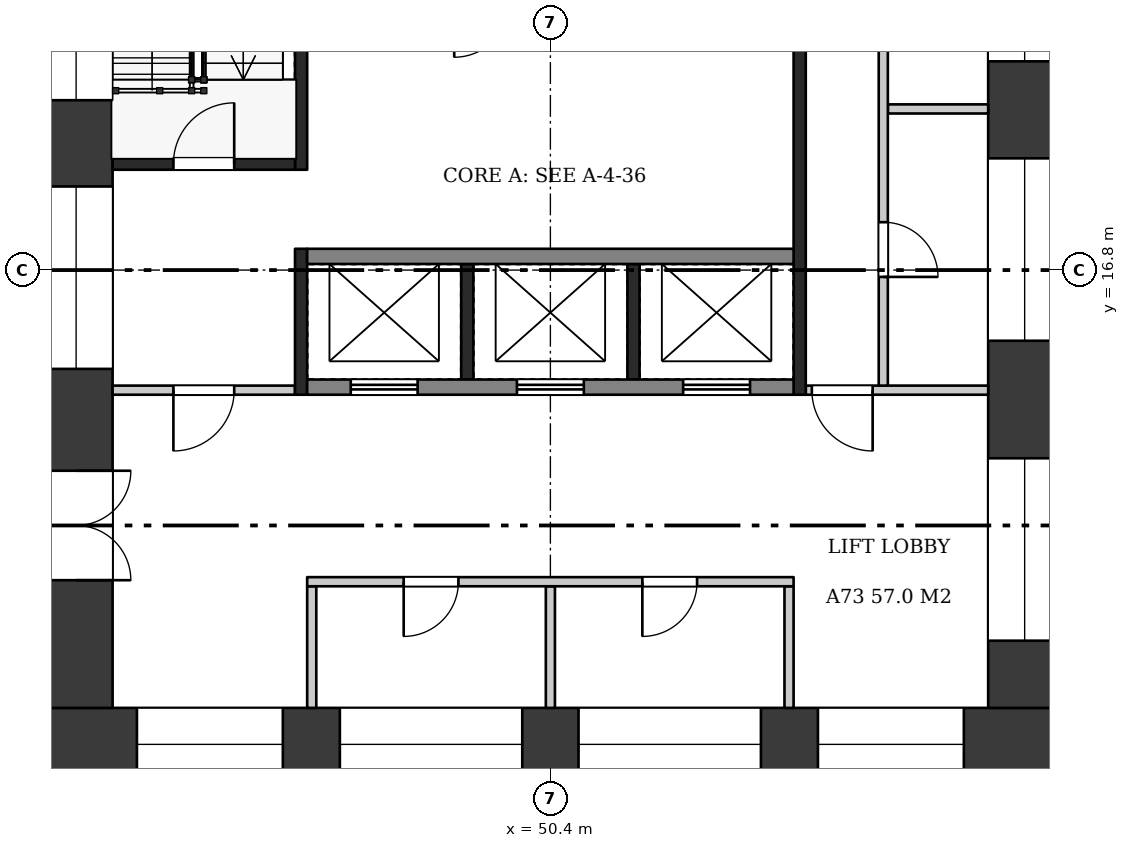
"""IFC4 building model, lengths in metres.
Left out: names, types, materials, properties, quantities, classifications, styles, units other than length and angle.
Written with IfcOpenShell. Run it as: python <this file> out.ifc"""

import sys

from ifc_helpers import new_model, si_unit, direction, frame, frame_2d, origin, origin_2d, place, context, subcontext, project, spatial, rectangle, extrude, element, fill, save


model = new_model("IFC4")
c1 = context("Model", 3, precision=1e-05, world=origin(), true_north=direction((0.0, 1.0)))
c2 = subcontext(c1, "Body", "Model", "MODEL_VIEW")
j1 = project(units=[si_unit("LENGTHUNIT", "METRE"), si_unit("PLANEANGLEUNIT", "RADIAN")], contexts=[c1])
p1 = place(None, origin())
s1 = spatial("IfcSite", under=j1, at=p1, CompositionType="ELEMENT")
p2 = place(p1, origin())
s2 = spatial("IfcBuilding", under=s1, at=p2, CompositionType="ELEMENT")
p3 = place(p2, frame((0.0, 0.0, 277.2)))
s3 = spatial("IfcBuildingStorey", under=s2, at=p3, CompositionType="ELEMENT", Elevation=277.2)
p4 = place(p3, frame((42.0, 9.0, 0.0), z_axis=(0.0, 0.0, 1.0), x_axis=(1.0, 0.0, 0.0)))
e1 = element("IfcWall", 1, at=p4, inside=s3, PredefinedType="SHEAR", context=c2, shape_type="SweptSolid", body=[
    extrude(rectangle(XDim=16.8, YDim=1.2, at=frame_2d((8.4, 0.0))), origin(), (0.0, 0.0, 1.0), 6.58),
])
p5 = place(p4, frame((1.6, 0.0, 0.6)))
e2 = element("IfcOpeningElement", 2, at=p5, cuts=e1, PredefinedType="OPENING", context=c2, shape_type="SweptSolid", body=[
    extrude(rectangle(XDim=2.4, YDim=2.1, at=frame_2d((1.2, 1.05))), frame((0.0, 0.61, 0.0), z_axis=(0.0, -1.0, 0.0), x_axis=(1.0, 0.0, 0.0)), (0.0, 0.0, 1.0), 1.22),
])
p6 = place(p4, frame((4.938, 0.0, 1.6)))
e3 = element("IfcOpeningElement", 3, at=p6, cuts=e1, PredefinedType="OPENING", context=c2, shape_type="SweptSolid", body=[
    extrude(rectangle(XDim=3.0, YDim=1.2, at=frame_2d((1.5, 0.6))), frame((0.0, 0.61, 0.0), z_axis=(0.0, -1.0, 0.0), x_axis=(1.0, 0.0, 0.0)), (0.0, 0.0, 1.0), 1.22),
])
p7 = place(p4, frame((8.863, 0.0, 1.6)))
e4 = element("IfcOpeningElement", 4, at=p7, cuts=e1, PredefinedType="OPENING", context=c2, shape_type="SweptSolid", body=[
    extrude(rectangle(XDim=3.0, YDim=1.2, at=frame_2d((1.5, 0.6))), frame((0.0, 0.61, 0.0), z_axis=(0.0, -1.0, 0.0), x_axis=(1.0, 0.0, 0.0)), (0.0, 0.0, 1.0), 1.22),
])
p8 = place(p4, frame((12.8, 0.0, 0.6)))
e5 = element("IfcOpeningElement", 5, at=p8, cuts=e1, PredefinedType="OPENING", context=c2, shape_type="SweptSolid", body=[
    extrude(rectangle(XDim=2.4, YDim=2.1, at=frame_2d((1.2, 1.05))), frame((0.0, 0.61, 0.0), z_axis=(0.0, -1.0, 0.0), x_axis=(1.0, 0.0, 0.0)), (0.0, 0.0, 1.0), 1.22),
])
p9 = place(p3, frame((42.6, 9.6, 0.0), z_axis=(0.0, 0.0, 1.0), x_axis=(0.0, 1.0, 0.0)))
e6 = element("IfcWall", 6, at=p9, inside=s3, PredefinedType="SHEAR", context=c2, shape_type="SweptSolid", body=[
    extrude(rectangle(XDim=14.4, YDim=1.2, at=frame_2d((7.2, 0.0))), origin(), (0.0, 0.0, 1.0), 6.58),
])
p10 = place(p9, frame((2.1, 0.0, 0.0)))
e7 = element("IfcOpeningElement", 7, at=p10, cuts=e6, PredefinedType="OPENING", context=c2, shape_type="SweptSolid", body=[
    extrude(rectangle(XDim=1.8, YDim=2.1, at=frame_2d((0.9, 1.05))), frame((0.0, 0.61, 0.0), z_axis=(0.0, -1.0, 0.0), x_axis=(1.0, 0.0, 0.0)), (0.0, 0.0, 1.0), 1.22),
])
p11 = place(p9, frame((5.575, 0.0, 0.6)))
e8 = element("IfcOpeningElement", 8, at=p11, cuts=e6, PredefinedType="OPENING", context=c2, shape_type="SweptSolid", body=[
    extrude(rectangle(XDim=3.0, YDim=2.1, at=frame_2d((1.5, 1.05))), frame((0.0, 0.61, 0.0), z_axis=(0.0, -1.0, 0.0), x_axis=(1.0, 0.0, 0.0)), (0.0, 0.0, 1.0), 1.22),
])
p12 = place(p9, frame((9.993, 0.0, 0.5)))
e9 = element("IfcOpeningElement", 9, at=p12, cuts=e6, PredefinedType="OPENING", context=c2, shape_type="SweptSolid", body=[
    extrude(rectangle(XDim=1.2, YDim=2.4, at=frame_2d((0.6, 1.2))), frame((0.0, 0.61, 0.0), z_axis=(0.0, -1.0, 0.0), x_axis=(1.0, 0.0, 0.0)), (0.0, 0.0, 1.0), 1.22),
])
p13 = place(p9, frame((12.197, 0.0, 0.5)))
e10 = element("IfcOpeningElement", 10, at=p13, cuts=e6, PredefinedType="OPENING", context=c2, shape_type="SweptSolid", body=[
    extrude(rectangle(XDim=1.2, YDim=2.4, at=frame_2d((0.6, 1.2))), frame((0.0, 0.61, 0.0), z_axis=(0.0, -1.0, 0.0), x_axis=(1.0, 0.0, 0.0)), (0.0, 0.0, 1.0), 1.22),
])
p14 = place(p3, frame((58.2, 9.6, 0.0), z_axis=(0.0, 0.0, 1.0), x_axis=(0.0, 1.0, 0.0)))
e11 = element("IfcWall", 11, at=p14, inside=s3, PredefinedType="SHEAR", context=c2, shape_type="SweptSolid", body=[
    extrude(rectangle(XDim=14.4, YDim=1.2, at=frame_2d((7.2, 0.0))), origin(), (0.0, 0.0, 1.0), 6.58),
])
p15 = place(p14, frame((1.105, 0.0, 0.6)))
e12 = element("IfcOpeningElement", 12, at=p15, cuts=e11, PredefinedType="OPENING", context=c2, shape_type="SweptSolid", body=[
    extrude(rectangle(XDim=3.0, YDim=2.1, at=frame_2d((1.5, 1.05))), frame((0.0, 0.61, 0.0), z_axis=(0.0, -1.0, 0.0), x_axis=(1.0, 0.0, 0.0)), (0.0, 0.0, 1.0), 1.22),
])
p16 = place(p14, frame((6.038, 0.0, 1.6)))
e13 = element("IfcOpeningElement", 13, at=p16, cuts=e11, PredefinedType="OPENING", context=c2, shape_type="SweptSolid", body=[
    extrude(rectangle(XDim=3.0, YDim=1.2, at=frame_2d((1.5, 0.6))), frame((0.0, 0.61, 0.0), z_axis=(0.0, -1.0, 0.0), x_axis=(1.0, 0.0, 0.0)), (0.0, 0.0, 1.0), 1.22),
])
p17 = place(p14, frame((10.633, 0.0, 1.6)))
e14 = element("IfcOpeningElement", 14, at=p17, cuts=e11, PredefinedType="OPENING", context=c2, shape_type="SweptSolid", body=[
    extrude(rectangle(XDim=3.0, YDim=1.2, at=frame_2d((1.5, 0.6))), frame((0.0, 0.61, 0.0), z_axis=(0.0, -1.0, 0.0), x_axis=(1.0, 0.0, 0.0)), (0.0, 0.0, 1.0), 1.22),
])
for number, where, z_axis, x_axis in (
    (15, (46.475, 9.6, 0.0), (0.0, 0.0, 1.0), (0.0, 1.0, 0.0)),
    (16, (54.325, 9.6, 0.0), (0.0, 0.0, 1.0), (0.0, 1.0, 0.0)),
    (17, (50.4, 9.6, 0.0), (0.0, 0.0, 1.0), (0.0, 1.0, 0.0)),
):
    element("IfcWall", number, at=place(p3, frame(where, z_axis=z_axis, x_axis=x_axis)), inside=s3, PredefinedType="PARTITIONING", context=c2, shape_type="SweptSolid", body=[
        extrude(rectangle(XDim=2.0, YDim=0.15, at=frame_2d((1.0, 0.0))), origin(), (0.0, 0.0, 1.0), 6.58),
    ])
p18 = place(p3, frame((46.4, 11.675, 0.0), z_axis=(0.0, 0.0, 1.0), x_axis=(1.0, 0.0, 0.0)))
e18 = element("IfcWall", 18, at=p18, inside=s3, PredefinedType="PARTITIONING", context=c2, shape_type="SweptSolid", body=[
    extrude(rectangle(XDim=8.0, YDim=0.15, at=frame_2d((4.0, 0.0))), origin(), (0.0, 0.0, 1.0), 6.58),
])
p19 = place(p18, frame((1.587, 0.0, 0.0)))
e19 = element("IfcOpeningElement", 19, at=p19, cuts=e18, PredefinedType="OPENING", context=c2, shape_type="SweptSolid", body=[
    extrude(rectangle(XDim=0.9, YDim=2.1, at=frame_2d((0.45, 1.05))), frame((0.0, 0.085, 0.0), z_axis=(0.0, -1.0, 0.0), x_axis=(1.0, 0.0, 0.0)), (0.0, 0.0, 1.0), 0.17),
])
p20 = place(p18, frame((5.512, 0.0, 0.0)))
e20 = element("IfcOpeningElement", 20, at=p20, cuts=e18, PredefinedType="OPENING", context=c2, shape_type="SweptSolid", body=[
    extrude(rectangle(XDim=0.9, YDim=2.1, at=frame_2d((0.45, 1.05))), frame((0.0, 0.085, 0.0), z_axis=(0.0, -1.0, 0.0), x_axis=(1.0, 0.0, 0.0)), (0.0, 0.0, 1.0), 0.17),
])
for number, where, z_axis, x_axis in (
    (21, (49.033, 15.0, 0.0), (0.0, 0.0, 1.0), (0.0, 1.0, 0.0)),
    (22, (51.767, 15.0, 0.0), (0.0, 0.0, 1.0), (0.0, 1.0, 0.0)),
):
    element("IfcWall", number, at=place(p3, frame(where, z_axis=z_axis, x_axis=x_axis)), inside=s3, PredefinedType="SHEAR", context=c2, shape_type="SweptSolid", body=[
        extrude(rectangle(XDim=1.9, YDim=0.2, at=frame_2d((0.95, 0.0))), origin(), (0.0, 0.0, 1.0), 6.58),
    ])
p21 = place(p3, frame((46.4, 14.875, 0.0), z_axis=(0.0, 0.0, 1.0), x_axis=(1.0, 0.0, 0.0)))
e23 = element("IfcWall", 23, at=p21, inside=s3, PredefinedType="SHEAR", context=c2, shape_type="SweptSolid", body=[
    extrude(rectangle(XDim=8.0, YDim=0.25, at=frame_2d((4.0, 0.0))), origin(), (0.0, 0.0, 1.0), 6.58),
])
p22 = place(p21, frame((0.717, 0.0, 0.0)))
e24 = element("IfcOpeningElement", 24, at=p22, cuts=e23, PredefinedType="OPENING", context=c2, shape_type="SweptSolid", body=[
    extrude(rectangle(XDim=1.1, YDim=2.1, at=frame_2d((0.55, 1.05))), frame((0.0, 0.135, 0.0), z_axis=(0.0, -1.0, 0.0), x_axis=(1.0, 0.0, 0.0)), (0.0, 0.0, 1.0), 0.27),
])
p23 = place(p21, frame((3.45, 0.0, 0.0)))
e25 = element("IfcOpeningElement", 25, at=p23, cuts=e23, PredefinedType="OPENING", context=c2, shape_type="SweptSolid", body=[
    extrude(rectangle(XDim=1.1, YDim=2.1, at=frame_2d((0.55, 1.05))), frame((0.0, 0.135, 0.0), z_axis=(0.0, -1.0, 0.0), x_axis=(1.0, 0.0, 0.0)), (0.0, 0.0, 1.0), 0.27),
])
p24 = place(p21, frame((6.183, 0.0, 0.0)))
e26 = element("IfcOpeningElement", 26, at=p24, cuts=e23, PredefinedType="OPENING", context=c2, shape_type="SweptSolid", body=[
    extrude(rectangle(XDim=1.1, YDim=2.1, at=frame_2d((0.55, 1.05))), frame((0.0, 0.135, 0.0), z_axis=(0.0, -1.0, 0.0), x_axis=(1.0, 0.0, 0.0)), (0.0, 0.0, 1.0), 0.27),
])
p25 = place(p3, frame((46.4, 17.025, 0.0), z_axis=(0.0, 0.0, 1.0), x_axis=(1.0, 0.0, 0.0)))
e27 = element("IfcWall", 27, at=p25, inside=s3, PredefinedType="SHEAR", context=c2, shape_type="SweptSolid", body=[
    extrude(rectangle(XDim=8.0, YDim=0.25, at=frame_2d((4.0, 0.0))), origin(), (0.0, 0.0, 1.0), 6.58),
])
p26 = place(p3, frame((46.3, 14.75, 0.0), z_axis=(0.0, 0.0, 1.0), x_axis=(0.0, 1.0, 0.0)))
e28 = element("IfcWall", 28, at=p26, inside=s3, PredefinedType="SHEAR", context=c2, shape_type="SweptSolid", body=[
    extrude(rectangle(XDim=2.4, YDim=0.2, at=frame_2d((1.2, 0.0))), origin(), (0.0, 0.0, 1.0), 6.58),
])
p27 = place(p3, frame((46.3, 18.45, 0.0), z_axis=(0.0, 0.0, 1.0), x_axis=(0.0, 1.0, 0.0)))
e29 = element("IfcWall", 29, at=p27, inside=s3, PredefinedType="SHEAR", context=c2, shape_type="SweptSolid", body=[
    extrude(rectangle(XDim=5.55, YDim=0.2, at=frame_2d((2.775, 0.0))), origin(), (0.0, 0.0, 1.0), 6.58),
])
p28 = place(p3, frame((43.2, 14.825, 0.0), z_axis=(0.0, 0.0, 1.0), x_axis=(1.0, 0.0, 0.0)))
e30 = element("IfcWall", 30, at=p28, inside=s3, PredefinedType="PARTITIONING", context=c2, shape_type="SweptSolid", body=[
    extrude(rectangle(XDim=3.0, YDim=0.15, at=frame_2d((1.5, 0.0))), origin(), (0.0, 0.0, 1.0), 6.58),
])
p29 = place(p28, frame((1.0, 0.0, 0.0)))
e31 = element("IfcOpeningElement", 31, at=p29, cuts=e30, PredefinedType="OPENING", context=c2, shape_type="SweptSolid", body=[
    extrude(rectangle(XDim=1.0, YDim=2.1, at=frame_2d((0.5, 1.05))), frame((0.0, 0.085, 0.0), z_axis=(0.0, -1.0, 0.0), x_axis=(1.0, 0.0, 0.0)), (0.0, 0.0, 1.0), 0.17),
])
p30 = place(p3, frame((43.2, 18.55, 0.0), z_axis=(0.0, 0.0, 1.0), x_axis=(1.0, 0.0, 0.0)))
e32 = element("IfcWall", 32, at=p30, inside=s3, PredefinedType="SHEAR", context=c2, shape_type="SweptSolid", body=[
    extrude(rectangle(XDim=3.0, YDim=0.2, at=frame_2d((1.5, 0.0))), origin(), (0.0, 0.0, 1.0), 6.58),
])
p31 = place(p30, frame((1.0, 0.0, 0.0)))
e33 = element("IfcOpeningElement", 33, at=p31, cuts=e32, PredefinedType="OPENING", context=c2, shape_type="SweptSolid", body=[
    extrude(rectangle(XDim=1.0, YDim=2.1, at=frame_2d((0.5, 1.05))), frame((0.0, 0.11, 0.0), z_axis=(0.0, -1.0, 0.0), x_axis=(1.0, 0.0, 0.0)), (0.0, 0.0, 1.0), 0.22),
])
p32 = place(p3, frame((54.5, 14.75, 0.0), z_axis=(0.0, 0.0, 1.0), x_axis=(0.0, 1.0, 0.0)))
e34 = element("IfcWall", 34, at=p32, inside=s3, PredefinedType="SHEAR", context=c2, shape_type="SweptSolid", body=[
    extrude(rectangle(XDim=9.25, YDim=0.2, at=frame_2d((4.625, 0.0))), origin(), (0.0, 0.0, 1.0), 6.58),
])
p33 = place(p3, frame((54.6, 14.825, 0.0), z_axis=(0.0, 0.0, 1.0), x_axis=(1.0, 0.0, 0.0)))
e35 = element("IfcWall", 35, at=p33, inside=s3, PredefinedType="PARTITIONING", context=c2, shape_type="SweptSolid", body=[
    extrude(rectangle(XDim=3.0, YDim=0.15, at=frame_2d((1.5, 0.0))), origin(), (0.0, 0.0, 1.0), 6.58),
])
p34 = place(p33, frame((0.1, 0.0, 0.0)))
e36 = element("IfcOpeningElement", 36, at=p34, cuts=e35, PredefinedType="OPENING", context=c2, shape_type="SweptSolid", body=[
    extrude(rectangle(XDim=1.0, YDim=2.1, at=frame_2d((0.5, 1.05))), frame((0.0, 0.085, 0.0), z_axis=(0.0, -1.0, 0.0), x_axis=(1.0, 0.0, 0.0)), (0.0, 0.0, 1.0), 0.17),
])
p35 = place(p3, frame((55.95, 19.45, 0.0), z_axis=(0.0, 0.0, 1.0), x_axis=(1.0, 0.0, 0.0)))
e37 = element("IfcWall", 37, at=p35, inside=s3, PredefinedType="PARTITIONING", context=c2, shape_type="SweptSolid", body=[
    extrude(rectangle(XDim=1.65, YDim=0.15, at=frame_2d((0.825, 0.0))), origin(), (0.0, 0.0, 1.0), 6.58),
])
p36 = place(p3, frame((55.875, 14.9, 0.0), z_axis=(0.0, 0.0, 1.0), x_axis=(0.0, 1.0, 0.0)))
e38 = element("IfcWall", 38, at=p36, inside=s3, PredefinedType="PARTITIONING", context=c2, shape_type="SweptSolid", body=[
    extrude(rectangle(XDim=9.1, YDim=0.15, at=frame_2d((4.55, 0.0))), origin(), (0.0, 0.0, 1.0), 6.58),
])
p37 = place(p36, frame((1.788, 0.0, 0.0)))
e39 = element("IfcOpeningElement", 39, at=p37, cuts=e38, PredefinedType="OPENING", context=c2, shape_type="SweptSolid", body=[
    extrude(rectangle(XDim=0.9, YDim=2.1, at=frame_2d((0.45, 1.05))), frame((0.0, 0.085, 0.0), z_axis=(0.0, -1.0, 0.0), x_axis=(1.0, 0.0, 0.0)), (0.0, 0.0, 1.0), 0.17),
])
p38 = place(p36, frame((6.413, 0.0, 0.0)))
e40 = element("IfcOpeningElement", 40, at=p38, cuts=e38, PredefinedType="OPENING", context=c2, shape_type="SweptSolid", body=[
    extrude(rectangle(XDim=0.9, YDim=2.1, at=frame_2d((0.45, 1.05))), frame((0.0, 0.085, 0.0), z_axis=(0.0, -1.0, 0.0), x_axis=(1.0, 0.0, 0.0)), (0.0, 0.0, 1.0), 0.17),
])
p39 = place(p10, frame((1.8, 0.0, 0.0), z_axis=(0.0, 0.0, 1.0), x_axis=(-1.0, 0.0, 0.0)))
e41 = element("IfcDoor", 41, at=p39, inside=s3, OperationType="DOUBLE_DOOR_SINGLE_SWING", PredefinedType="DOOR", context=c2, shape_type="SweptSolid", body=[
    extrude(rectangle(XDim=1.8, YDim=2.1, at=frame_2d((0.9, 1.05))), frame((0.0, 0.025, 0.0), z_axis=(0.0, -1.0, 0.0), x_axis=(1.0, 0.0, 0.0)), (0.0, 0.0, 1.0), 0.05),
])
fill(e7, e41)
p40 = place(p19, frame((0.9, 0.0, 0.0), z_axis=(0.0, 0.0, 1.0), x_axis=(-1.0, 0.0, 0.0)))
e42 = element("IfcDoor", 42, at=p40, inside=s3, OperationType="SINGLE_SWING_RIGHT", PredefinedType="DOOR", context=c2, shape_type="SweptSolid", body=[
    extrude(rectangle(XDim=0.9, YDim=2.1, at=frame_2d((0.45, 1.05))), frame((0.0, 0.025, 0.0), z_axis=(0.0, -1.0, 0.0), x_axis=(1.0, 0.0, 0.0)), (0.0, 0.0, 1.0), 0.05),
])
fill(e19, e42)
p41 = place(p20, frame((0.9, 0.0, 0.0), z_axis=(0.0, 0.0, 1.0), x_axis=(-1.0, 0.0, 0.0)))
e43 = element("IfcDoor", 43, at=p41, inside=s3, OperationType="SINGLE_SWING_RIGHT", PredefinedType="DOOR", context=c2, shape_type="SweptSolid", body=[
    extrude(rectangle(XDim=0.9, YDim=2.1, at=frame_2d((0.45, 1.05))), frame((0.0, 0.025, 0.0), z_axis=(0.0, -1.0, 0.0), x_axis=(1.0, 0.0, 0.0)), (0.0, 0.0, 1.0), 0.05),
])
fill(e20, e43)
p42 = place(p22, origin())
e44 = element("IfcDoor", 44, at=p42, inside=s3, OperationType="DOUBLE_DOOR_SLIDING", PredefinedType="DOOR", context=c2, shape_type="SweptSolid", body=[
    extrude(rectangle(XDim=1.1, YDim=2.1, at=frame_2d((0.55, 1.05))), frame((0.0, 0.025, 0.0), z_axis=(0.0, -1.0, 0.0), x_axis=(1.0, 0.0, 0.0)), (0.0, 0.0, 1.0), 0.05),
])
fill(e24, e44)
p43 = place(p23, origin())
e45 = element("IfcDoor", 45, at=p43, inside=s3, OperationType="DOUBLE_DOOR_SLIDING", PredefinedType="DOOR", context=c2, shape_type="SweptSolid", body=[
    extrude(rectangle(XDim=1.1, YDim=2.1, at=frame_2d((0.55, 1.05))), frame((0.0, 0.025, 0.0), z_axis=(0.0, -1.0, 0.0), x_axis=(1.0, 0.0, 0.0)), (0.0, 0.0, 1.0), 0.05),
])
fill(e25, e45)
p44 = place(p24, origin())
e46 = element("IfcDoor", 46, at=p44, inside=s3, OperationType="DOUBLE_DOOR_SLIDING", PredefinedType="DOOR", context=c2, shape_type="SweptSolid", body=[
    extrude(rectangle(XDim=1.1, YDim=2.1, at=frame_2d((0.55, 1.05))), frame((0.0, 0.025, 0.0), z_axis=(0.0, -1.0, 0.0), x_axis=(1.0, 0.0, 0.0)), (0.0, 0.0, 1.0), 0.05),
])
fill(e26, e46)
p45 = place(p29, frame((1.0, 0.0, 0.0), z_axis=(0.0, 0.0, 1.0), x_axis=(-1.0, 0.0, 0.0)))
e47 = element("IfcDoor", 47, at=p45, inside=s3, OperationType="SINGLE_SWING_RIGHT", PredefinedType="DOOR", context=c2, shape_type="SweptSolid", body=[
    extrude(rectangle(XDim=1.0, YDim=2.1, at=frame_2d((0.5, 1.05))), frame((0.0, 0.025, 0.0), z_axis=(0.0, -1.0, 0.0), x_axis=(1.0, 0.0, 0.0)), (0.0, 0.0, 1.0), 0.05),
])
fill(e31, e47)
p46 = place(p31, origin())
e48 = element("IfcDoor", 48, at=p46, inside=s3, OperationType="SINGLE_SWING_RIGHT", PredefinedType="DOOR", context=c2, shape_type="SweptSolid", body=[
    extrude(rectangle(XDim=1.0, YDim=2.1, at=frame_2d((0.5, 1.05))), frame((0.0, 0.025, 0.0), z_axis=(0.0, -1.0, 0.0), x_axis=(1.0, 0.0, 0.0)), (0.0, 0.0, 1.0), 0.05),
])
fill(e33, e48)
p47 = place(p34, frame((1.0, 0.0, 0.0), z_axis=(0.0, 0.0, 1.0), x_axis=(-1.0, 0.0, 0.0)))
e49 = element("IfcDoor", 49, at=p47, inside=s3, OperationType="SINGLE_SWING_LEFT", PredefinedType="DOOR", context=c2, shape_type="SweptSolid", body=[
    extrude(rectangle(XDim=1.0, YDim=2.1, at=frame_2d((0.5, 1.05))), frame((0.0, 0.025, 0.0), z_axis=(0.0, -1.0, 0.0), x_axis=(1.0, 0.0, 0.0)), (0.0, 0.0, 1.0), 0.05),
])
fill(e36, e49)
p48 = place(p37, frame((0.9, 0.0, 0.0), z_axis=(0.0, 0.0, 1.0), x_axis=(-1.0, 0.0, 0.0)))
e50 = element("IfcDoor", 50, at=p48, inside=s3, OperationType="SINGLE_SWING_RIGHT", PredefinedType="DOOR", context=c2, shape_type="SweptSolid", body=[
    extrude(rectangle(XDim=0.9, YDim=2.1, at=frame_2d((0.45, 1.05))), frame((0.0, 0.025, 0.0), z_axis=(0.0, -1.0, 0.0), x_axis=(1.0, 0.0, 0.0)), (0.0, 0.0, 1.0), 0.05),
])
fill(e39, e50)
p49 = place(p5, origin())
e51 = element("IfcWindow", 51, at=p49, inside=s3, PartitioningType="SINGLE_PANEL", PredefinedType="WINDOW", context=c2, shape_type="SweptSolid", body=[
    extrude(rectangle(XDim=2.4, YDim=2.1, at=frame_2d((1.2, 1.05))), frame((0.0, 0.03, 0.0), z_axis=(0.0, -1.0, 0.0), x_axis=(1.0, 0.0, 0.0)), (0.0, 0.0, 1.0), 0.06),
])
fill(e2, e51)
p50 = place(p6, origin())
e52 = element("IfcWindow", 52, at=p50, inside=s3, PartitioningType="SINGLE_PANEL", PredefinedType="WINDOW", context=c2, shape_type="SweptSolid", body=[
    extrude(rectangle(XDim=3.0, YDim=1.2, at=frame_2d((1.5, 0.6))), frame((0.0, 0.03, 0.0), z_axis=(0.0, -1.0, 0.0), x_axis=(1.0, 0.0, 0.0)), (0.0, 0.0, 1.0), 0.06),
])
fill(e3, e52)
p51 = place(p7, origin())
e53 = element("IfcWindow", 53, at=p51, inside=s3, PartitioningType="SINGLE_PANEL", PredefinedType="WINDOW", context=c2, shape_type="SweptSolid", body=[
    extrude(rectangle(XDim=3.0, YDim=1.2, at=frame_2d((1.5, 0.6))), frame((0.0, 0.03, 0.0), z_axis=(0.0, -1.0, 0.0), x_axis=(1.0, 0.0, 0.0)), (0.0, 0.0, 1.0), 0.06),
])
fill(e4, e53)
p52 = place(p8, origin())
e54 = element("IfcWindow", 54, at=p52, inside=s3, PartitioningType="SINGLE_PANEL", PredefinedType="WINDOW", context=c2, shape_type="SweptSolid", body=[
    extrude(rectangle(XDim=2.4, YDim=2.1, at=frame_2d((1.2, 1.05))), frame((0.0, 0.03, 0.0), z_axis=(0.0, -1.0, 0.0), x_axis=(1.0, 0.0, 0.0)), (0.0, 0.0, 1.0), 0.06),
])
fill(e5, e54)
p53 = place(p11, origin())
e55 = element("IfcWindow", 55, at=p53, inside=s3, PartitioningType="SINGLE_PANEL", PredefinedType="WINDOW", context=c2, shape_type="SweptSolid", body=[
    extrude(rectangle(XDim=3.0, YDim=2.1, at=frame_2d((1.5, 1.05))), frame((0.0, 0.03, 0.0), z_axis=(0.0, -1.0, 0.0), x_axis=(1.0, 0.0, 0.0)), (0.0, 0.0, 1.0), 0.06),
])
fill(e8, e55)
p54 = place(p12, origin())
e56 = element("IfcWindow", 56, at=p54, inside=s3, PartitioningType="SINGLE_PANEL", PredefinedType="WINDOW", context=c2, shape_type="SweptSolid", body=[
    extrude(rectangle(XDim=1.2, YDim=2.4, at=frame_2d((0.6, 1.2))), frame((0.0, 0.03, 0.0), z_axis=(0.0, -1.0, 0.0), x_axis=(1.0, 0.0, 0.0)), (0.0, 0.0, 1.0), 0.06),
])
fill(e9, e56)
p55 = place(p15, origin())
e57 = element("IfcWindow", 57, at=p55, inside=s3, PartitioningType="SINGLE_PANEL", PredefinedType="WINDOW", context=c2, shape_type="SweptSolid", body=[
    extrude(rectangle(XDim=3.0, YDim=2.1, at=frame_2d((1.5, 1.05))), frame((0.0, 0.03, 0.0), z_axis=(0.0, -1.0, 0.0), x_axis=(1.0, 0.0, 0.0)), (0.0, 0.0, 1.0), 0.06),
])
fill(e12, e57)
p56 = place(p16, origin())
e58 = element("IfcWindow", 58, at=p56, inside=s3, PartitioningType="SINGLE_PANEL", PredefinedType="WINDOW", context=c2, shape_type="SweptSolid", body=[
    extrude(rectangle(XDim=3.0, YDim=1.2, at=frame_2d((1.5, 0.6))), frame((0.0, 0.03, 0.0), z_axis=(0.0, -1.0, 0.0), x_axis=(1.0, 0.0, 0.0)), (0.0, 0.0, 1.0), 0.06),
])
fill(e13, e58)
p57 = place(p17, origin())
e59 = element("IfcWindow", 59, at=p57, inside=s3, PartitioningType="SINGLE_PANEL", PredefinedType="WINDOW", context=c2, shape_type="SweptSolid", body=[
    extrude(rectangle(XDim=3.0, YDim=1.2, at=frame_2d((1.5, 0.6))), frame((0.0, 0.03, 0.0), z_axis=(0.0, -1.0, 0.0), x_axis=(1.0, 0.0, 0.0)), (0.0, 0.0, 1.0), 0.06),
])
fill(e14, e59)
p58 = place(p2, frame((0.0, 0.0, 287.45)))
p59 = place(p58, frame((0.0, 0.0, -0.25)))
p60 = place(p59, frame((50.4, 15.95, 0.0)))
p61 = place(p60, frame((0.0, 0.0, 0.2)))
e60 = element("IfcWindow", 60, at=p61, inside=s3, PartitioningType="SINGLE_PANEL", PredefinedType="SKYLIGHT", context=c2, shape_type="SweptSolid", body=[
    extrude(rectangle(XDim=0.9, YDim=0.9, at=origin_2d()), origin(), (0.0, 0.0, 1.0), 0.05),
])
save(model, sys.argv[1])
